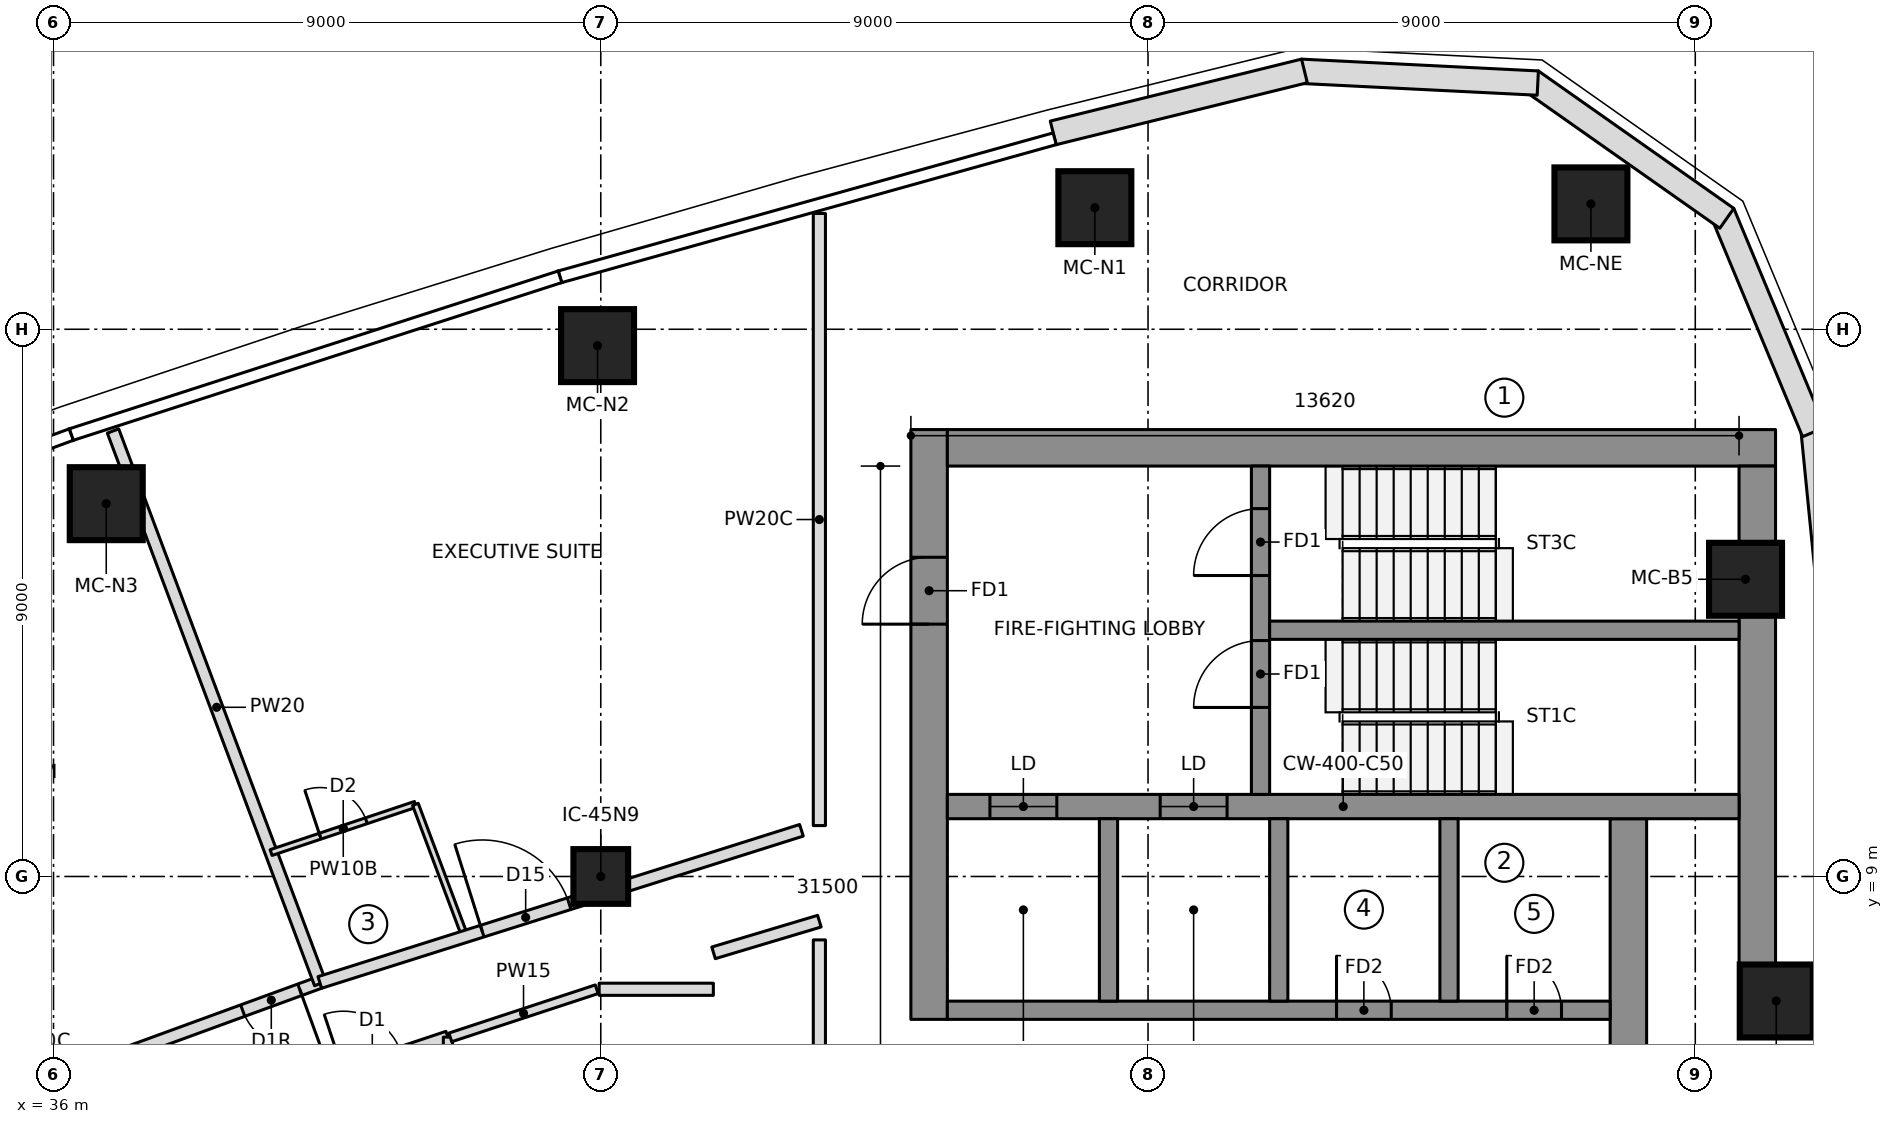
"""IFC4 building model, lengths in metres.
Left out: names, types, materials, properties, quantities, classifications, styles, units other than length and angle.
Written with IfcOpenShell. Run it as: python <this file> out.ifc"""

import sys

from ifc_helpers import new_model, si_unit, direction, frame, frame_2d, origin, origin_2d, place, context, subcontext, project, spatial, polyline, rectangle, outline, extrude, element, fill, save


model = new_model("IFC4")
c1 = context("Model", 3, precision=1e-05, world=origin(), true_north=direction((0.0, 1.0)))
c2 = subcontext(c1, "Body", "Model", "MODEL_VIEW")
j1 = project(units=[si_unit("LENGTHUNIT", "METRE"), si_unit("PLANEANGLEUNIT", "RADIAN")], contexts=[c1])
p1 = place(None, origin())
s1 = spatial("IfcSite", under=j1, at=p1, CompositionType="ELEMENT")
p2 = place(p1, origin())
s2 = spatial("IfcBuilding", under=s1, at=p2, CompositionType="ELEMENT")
p3 = place(p2, frame((0.0, 0.0, 238.55)))
s3 = spatial("IfcBuildingStorey", under=s2, at=p3, CompositionType="ELEMENT", Elevation=238.55)
p4 = place(p3, frame((50.4, 6.65, 0.0), z_axis=(0.0, 0.0, 1.0), x_axis=(0.0, 1.0, 0.0)))
e1 = element("IfcWall", 1, at=p4, inside=s3, PredefinedType="SHEAR", context=c2, shape_type="SweptSolid", body=[
    extrude(rectangle(XDim=9.7, YDim=0.6, at=frame_2d((4.85, 0.0))), origin(), (0.0, 0.0, 1.0), 3.55),
])
p5 = place(p4, frame((6.5, 0.0, 0.0)))
e2 = element("IfcOpeningElement", 2, at=p5, cuts=e1, PredefinedType="OPENING", context=c2, shape_type="SweptSolid", body=[
    extrude(rectangle(XDim=1.1, YDim=2.1, at=frame_2d((0.55, 1.05))), frame((0.0, 0.31, 0.0), z_axis=(0.0, -1.0, 0.0), x_axis=(1.0, 0.0, 0.0)), (0.0, 0.0, 1.0), 0.62),
])
p6 = place(p3, frame((50.7, 16.05, 0.0), z_axis=(0.0, 0.0, 1.0), x_axis=(1.0, 0.0, 0.0)))
e3 = element("IfcWall", 3, at=p6, inside=s3, PredefinedType="SHEAR", context=c2, shape_type="SweptSolid", body=[
    extrude(rectangle(XDim=13.62, YDim=0.6, at=frame_2d((6.81, 0.0))), origin(), (0.0, 0.0, 1.0), 3.55),
])
p7 = place(p3, frame((64.02, 7.502, 0.0), z_axis=(0.0, 0.0, 1.0), x_axis=(0.0, 1.0, 0.0)))
e4 = element("IfcWall", 4, at=p7, inside=s3, PredefinedType="SHEAR", context=c2, shape_type="SweptSolid", body=[
    extrude(rectangle(XDim=8.248, YDim=0.6, at=frame_2d((4.124, 0.0))), origin(), (0.0, 0.0, 1.0), 3.55),
])
p8 = place(p3, frame((61.9, -9.95, 0.0), z_axis=(0.0, 0.0, 1.0), x_axis=(0.0, 1.0, 0.0)))
e5 = element("IfcWall", 5, at=p8, inside=s3, PredefinedType="SHEAR", context=c2, shape_type="SweptSolid", body=[
    extrude(rectangle(XDim=19.9, YDim=0.6, at=frame_2d((9.95, 0.0))), origin(), (0.0, 0.0, 1.0), 3.55),
])
p9 = place(p3, frame((50.7, 10.15, 0.0), z_axis=(0.0, 0.0, 1.0), x_axis=(1.0, 0.0, 0.0)))
e6 = element("IfcWall", 6, at=p9, inside=s3, PredefinedType="SHEAR", context=c2, shape_type="SweptSolid", body=[
    extrude(rectangle(XDim=13.02, YDim=0.4, at=frame_2d((6.51, 0.0))), origin(), (0.0, 0.0, 1.0), 3.55),
])
p10 = place(p9, frame((0.7, 0.0, 0.0)))
e7 = element("IfcOpeningElement", 7, at=p10, cuts=e6, PredefinedType="OPENING", context=c2, shape_type="SweptSolid", body=[
    extrude(rectangle(XDim=1.1, YDim=2.1, at=frame_2d((0.55, 1.05))), frame((0.0, 0.21, 0.0), z_axis=(0.0, -1.0, 0.0), x_axis=(1.0, 0.0, 0.0)), (0.0, 0.0, 1.0), 0.42),
])
p11 = place(p9, frame((3.5, 0.0, 0.0)))
e8 = element("IfcOpeningElement", 8, at=p11, cuts=e6, PredefinedType="OPENING", context=c2, shape_type="SweptSolid", body=[
    extrude(rectangle(XDim=1.1, YDim=2.1, at=frame_2d((0.55, 1.05))), frame((0.0, 0.21, 0.0), z_axis=(0.0, -1.0, 0.0), x_axis=(1.0, 0.0, 0.0)), (0.0, 0.0, 1.0), 0.42),
])
p12 = place(p3, frame((50.7, 6.8, 0.0), z_axis=(0.0, 0.0, 1.0), x_axis=(1.0, 0.0, 0.0)))
e9 = element("IfcWall", 9, at=p12, inside=s3, PredefinedType="SHEAR", context=c2, shape_type="SweptSolid", body=[
    extrude(rectangle(XDim=10.9, YDim=0.3, at=frame_2d((5.45, 0.0))), origin(), (0.0, 0.0, 1.0), 3.55),
])
p13 = place(p12, frame((6.4, 0.0, 0.0)))
e10 = element("IfcOpeningElement", 10, at=p13, cuts=e9, PredefinedType="OPENING", context=c2, shape_type="SweptSolid", body=[
    extrude(rectangle(XDim=0.9, YDim=2.1, at=frame_2d((0.45, 1.05))), frame((0.0, 0.16, 0.0), z_axis=(0.0, -1.0, 0.0), x_axis=(1.0, 0.0, 0.0)), (0.0, 0.0, 1.0), 0.32),
])
p14 = place(p12, frame((9.2, 0.0, 0.0)))
e11 = element("IfcOpeningElement", 11, at=p14, cuts=e9, PredefinedType="OPENING", context=c2, shape_type="SweptSolid", body=[
    extrude(rectangle(XDim=0.9, YDim=2.1, at=frame_2d((0.45, 1.05))), frame((0.0, 0.16, 0.0), z_axis=(0.0, -1.0, 0.0), x_axis=(1.0, 0.0, 0.0)), (0.0, 0.0, 1.0), 0.32),
])
for number, where, z_axis, x_axis in (
    (12, (53.35, 6.95, 0.0), (0.0, 0.0, 1.0), (0.0, 1.0, 0.0)),
    (13, (56.15, 6.95, 0.0), (0.0, 0.0, 1.0), (0.0, 1.0, 0.0)),
    (14, (58.95, 6.95, 0.0), (0.0, 0.0, 1.0), (0.0, 1.0, 0.0)),
):
    element("IfcWall", number, at=place(p3, frame(where, z_axis=z_axis, x_axis=x_axis)), inside=s3, PredefinedType="SHEAR", context=c2, shape_type="SweptSolid", body=[
        extrude(rectangle(XDim=3.0, YDim=0.3, at=frame_2d((1.5, 0.0))), origin(), (0.0, 0.0, 1.0), 3.55),
    ])
p15 = place(p3, frame((55.85, 10.35, 0.0), z_axis=(0.0, 0.0, 1.0), x_axis=(0.0, 1.0, 0.0)))
e15 = element("IfcWall", 15, at=p15, inside=s3, PredefinedType="SHEAR", context=c2, shape_type="SweptSolid", body=[
    extrude(rectangle(XDim=5.4, YDim=0.3, at=frame_2d((2.7, 0.0))), origin(), (0.0, 0.0, 1.0), 3.55),
])
p16 = place(p15, frame((1.43, 0.0, 0.0)))
e16 = element("IfcOpeningElement", 16, at=p16, cuts=e15, PredefinedType="OPENING", context=c2, shape_type="SweptSolid", body=[
    extrude(rectangle(XDim=1.1, YDim=2.1, at=frame_2d((0.55, 1.05))), frame((0.0, 0.16, 0.0), z_axis=(0.0, -1.0, 0.0), x_axis=(1.0, 0.0, 0.0)), (0.0, 0.0, 1.0), 0.32),
])
p17 = place(p15, frame((3.6, 0.0, 0.0)))
e17 = element("IfcOpeningElement", 17, at=p17, cuts=e15, PredefinedType="OPENING", context=c2, shape_type="SweptSolid", body=[
    extrude(rectangle(XDim=1.1, YDim=2.1, at=frame_2d((0.55, 1.05))), frame((0.0, 0.16, 0.0), z_axis=(0.0, -1.0, 0.0), x_axis=(1.0, 0.0, 0.0)), (0.0, 0.0, 1.0), 0.32),
])
p18 = place(p3, frame((56.0, 13.05, 0.0), z_axis=(0.0, 0.0, 1.0), x_axis=(1.0, 0.0, 0.0)))
e18 = element("IfcWall", 18, at=p18, inside=s3, PredefinedType="SHEAR", context=c2, shape_type="SweptSolid", body=[
    extrude(rectangle(XDim=7.72, YDim=0.3, at=frame_2d((3.86, 0.0))), origin(), (0.0, 0.0, 1.0), 3.55),
])
for number, where, z_axis, x_axis in (
    (19, (64.332, 6.952, 0.0), (0.0, 0.0, 1.0), (1.0, 0.0, 0.0)),
    (20, (63.826, 13.888, 0.0), (0.0, 0.0, 1.0), (1.0, 0.0, 0.0)),
    (21, (61.284, 20.062, 0.0), (0.0, 0.0, 1.0), (1.0, 0.0, 0.0)),
    (22, (53.125, 20.0, 0.0), (0.0, 0.0, 1.0), (1.0, 0.0, 0.0)),
    (23, (44.947, 17.731, 0.0), (0.0, 0.0, 1.0), (1.0, 0.0, 0.0)),
    (24, (36.867, 15.132, 0.0), (0.0, 0.0, 1.0), (1.0, 0.0, 0.0)),
):
    element("IfcColumn", number, at=place(p3, frame(where, z_axis=z_axis, x_axis=x_axis)), inside=s3, PredefinedType="COLUMN", context=c2, shape_type="SweptSolid", body=[
        extrude(rectangle(XDim=1.2, YDim=1.2, at=origin_2d()), origin(), (0.0, 0.0, 1.0), 3.55),
    ])
p19 = place(p3, frame((45.0, 9.0, 0.0), z_axis=(0.0, 0.0, 1.0), x_axis=(1.0, 0.0, 0.0)))
e25 = element("IfcColumn", 25, at=p19, inside=s3, PredefinedType="COLUMN", context=c2, shape_type="SweptSolid", body=[
    extrude(rectangle(XDim=0.9, YDim=0.9, at=origin_2d()), origin(), (0.0, 0.0, 1.0), 3.55),
])
p20 = place(p3, frame((65.342, 12.264, 0.0), z_axis=(0.0, 0.0, 1.0), x_axis=(-0.098718218066, 0.995115427185, 0.0)))
e26 = element("IfcWall", 26, at=p20, inside=s3, PredefinedType="NOTDEFINED", context=c2, shape_type="SweptSolid", body=[
    extrude(outline(polyline([(-0.003, -0.2), (4.123, -0.2), (4.063, 0.2), (0.003, 0.2), (-0.003, -0.2)])), origin(), (0.0, 0.0, 1.0), 3.25),
])
p21 = place(p3, frame((64.938, 16.337, 0.0), z_axis=(0.0, 0.0, 1.0), x_axis=(-0.3844335483, 0.923152667191, 0.0)))
e27 = element("IfcWall", 27, at=p21, inside=s3, PredefinedType="NOTDEFINED", context=c2, shape_type="SweptSolid", body=[
    extrude(outline(polyline([(-0.03, -0.2), (3.871, -0.2), (3.756, 0.2), (0.03, 0.2), (-0.03, -0.2)])), origin(), (0.0, 0.0, 1.0), 3.25),
])
p22 = place(p3, frame((63.471, 19.858, 0.0), z_axis=(0.0, 0.0, 1.0), x_axis=(-0.817942545532, 0.575299915009, 0.0)))
e28 = element("IfcWall", 28, at=p22, inside=s3, PredefinedType="NOTDEFINED", context=c2, shape_type="SweptSolid", body=[
    extrude(outline(polyline([(-0.058, -0.2), (3.871, -0.2), (3.756, 0.2), (0.058, 0.2), (-0.058, -0.2)])), origin(), (0.0, 0.0, 1.0), 3.25),
])
p23 = place(p3, frame((60.352, 22.052, 0.0), z_axis=(0.0, 0.0, 1.0), x_axis=(-0.998758875872, 0.049806705046, 0.0)))
e29 = element("IfcWall", 29, at=p23, inside=s3, PredefinedType="NOTDEFINED", context=c2, shape_type="SweptSolid", body=[
    extrude(outline(polyline([(-0.058, -0.2), (3.843, -0.2), (3.784, 0.2), (0.058, 0.2), (-0.058, -0.2)])), origin(), (0.0, 0.0, 1.0), 3.25),
])
p24 = place(p3, frame((56.543, 22.242, 0.0), z_axis=(0.0, 0.0, 1.0), x_axis=(-0.970902342456, -0.23947576373, 0.0)))
e30 = element("IfcWall", 30, at=p24, inside=s3, PredefinedType="NOTDEFINED", context=c2, shape_type="SweptSolid", body=[
    extrude(outline(polyline([(-0.029, -0.2), (4.226, -0.2), (4.226, 0.2), (0.029, 0.2), (-0.029, -0.2)])), origin(), (0.0, 0.0, 1.0), 3.25),
])
p25 = place(p3, frame((40.38, 7.257, 0.0), z_axis=(0.0, 0.0, 1.0), x_axis=(-0.939266239759, -0.343189351305, 0.0)))
e31 = element("IfcWall", 31, at=p25, inside=s3, PredefinedType="PARTITIONING", context=c2, shape_type="SweptSolid", body=[
    extrude(rectangle(XDim=9.2, YDim=0.2, at=frame_2d((4.6, 0.0))), origin(), (0.0, 0.0, 1.0), 3.25),
])
p26 = place(p25, frame((0.35, 0.0, 0.0)))
e32 = element("IfcOpeningElement", 32, at=p26, cuts=e31, PredefinedType="OPENING", context=c2, shape_type="SweptSolid", body=[
    extrude(rectangle(XDim=1.0, YDim=2.1, at=frame_2d((0.5, 1.05))), frame((0.0, 0.11, 0.0), z_axis=(0.0, -1.0, 0.0), x_axis=(1.0, 0.0, 0.0)), (0.0, 0.0, 1.0), 0.22),
])
p27 = place(p3, frame((40.387, 7.238, 0.0), z_axis=(0.0, 0.0, 1.0), x_axis=(-0.351098633881, 0.936338480084, 0.0)))
e33 = element("IfcWall", 33, at=p27, inside=s3, PredefinedType="PARTITIONING", context=c2, shape_type="SweptSolid", body=[
    extrude(rectangle(XDim=9.707, YDim=0.2, at=frame_2d((4.853, 0.0))), origin(), (0.0, 0.0, 1.0), 3.25),
])
p28 = place(p3, frame((39.579, 9.393, 0.0), z_axis=(0.0, 0.0, 1.0), x_axis=(0.948468383404, 0.316871781141, 0.0)))
e34 = element("IfcWall", 34, at=p28, inside=s3, PredefinedType="PARTITIONING", context=c2, shape_type="SweptSolid", body=[
    extrude(rectangle(XDim=2.502, YDim=0.1, at=frame_2d((1.251, 0.0))), origin(), (0.0, 0.0, 1.0), 3.25),
])
p29 = place(p28, frame((0.85, 0.0, 0.0)))
e35 = element("IfcOpeningElement", 35, at=p29, cuts=e34, PredefinedType="OPENING", context=c2, shape_type="SweptSolid", body=[
    extrude(rectangle(XDim=0.8, YDim=2.1, at=frame_2d((0.4, 1.05))), frame((0.0, 0.06, 0.0), z_axis=(0.0, -1.0, 0.0), x_axis=(1.0, 0.0, 0.0)), (0.0, 0.0, 1.0), 0.12),
])
p30 = place(p3, frame((41.951, 10.186, 0.0), z_axis=(0.0, 0.0, 1.0), x_axis=(0.351146927505, -0.936320370014, 0.0)))
e36 = element("IfcWall", 36, at=p30, inside=s3, PredefinedType="PARTITIONING", context=c2, shape_type="SweptSolid", body=[
    extrude(rectangle(XDim=2.278, YDim=0.1, at=frame_2d((1.139, 0.0))), origin(), (0.0, 0.0, 1.0), 3.25),
])
p31 = place(p3, frame((39.999, 5.527, 0.0), z_axis=(0.0, 0.0, 1.0), x_axis=(0.948459565489, 0.316898173918, 0.0)))
e37 = element("IfcWall", 37, at=p31, inside=s3, PredefinedType="PARTITIONING", context=c2, shape_type="SweptSolid", body=[
    extrude(rectangle(XDim=2.622, YDim=0.2, at=frame_2d((1.311, 0.0))), origin(), (0.0, 0.0, 1.0), 3.25),
])
p32 = place(p31, frame((0.811, 0.0, 0.0)))
e38 = element("IfcOpeningElement", 38, at=p32, cuts=e37, PredefinedType="OPENING", context=c2, shape_type="SweptSolid", body=[
    extrude(rectangle(XDim=1.0, YDim=2.1, at=frame_2d((0.5, 1.05))), frame((0.0, 0.11, 0.0), z_axis=(0.0, -1.0, 0.0), x_axis=(1.0, 0.0, 0.0)), (0.0, 0.0, 1.0), 0.22),
])
p33 = place(p3, frame((42.486, -6.358, 0.0), z_axis=(0.0, 0.0, 1.0), x_axis=(0.0, 1.0, 0.0)))
e39 = element("IfcWall", 39, at=p33, inside=s3, PredefinedType="PARTITIONING", context=c2, shape_type="SweptSolid", body=[
    extrude(rectangle(XDim=12.716, YDim=0.15, at=frame_2d((6.358, 0.0))), origin(), (0.0, 0.0, 1.0), 3.25),
])
p34 = place(p3, frame((40.38, 7.257, 0.0), z_axis=(0.0, 0.0, 1.0), x_axis=(0.953536454425, 0.301277662768, 0.0)))
e40 = element("IfcWall", 40, at=p34, inside=s3, PredefinedType="PARTITIONING", context=c2, shape_type="SweptSolid", body=[
    extrude(rectangle(XDim=8.306, YDim=0.2, at=frame_2d((4.153, 0.0))), origin(), (0.0, 0.0, 1.0), 3.25),
])
p35 = place(p34, frame((2.8, 0.0, 0.0)))
e41 = element("IfcOpeningElement", 41, at=p35, cuts=e40, PredefinedType="OPENING", context=c2, shape_type="SweptSolid", body=[
    extrude(rectangle(XDim=1.5, YDim=2.1, at=frame_2d((0.75, 1.05))), frame((0.0, 0.11, 0.0), z_axis=(0.0, -1.0, 0.0), x_axis=(1.0, 0.0, 0.0)), (0.0, 0.0, 1.0), 0.22),
])
p36 = place(p3, frame((48.595, 7.957, 0.0), z_axis=(0.0, 0.0, 1.0), x_axis=(0.0, -1.0, 0.0)))
e42 = element("IfcWall", 42, at=p36, inside=s3, PredefinedType="PARTITIONING", context=c2, shape_type="SweptSolid", body=[
    extrude(rectangle(XDim=15.914, YDim=0.2, at=frame_2d((7.957, 0.0))), origin(), (0.0, 0.0, 1.0), 3.25),
])
p37 = place(p36, frame((7.457, 0.0, 0.0)))
e43 = element("IfcOpeningElement", 43, at=p37, cuts=e42, PredefinedType="OPENING", context=c2, shape_type="SweptSolid", body=[
    extrude(rectangle(XDim=1.0, YDim=2.1, at=frame_2d((0.5, 1.05))), frame((0.0, 0.11, 0.0), z_axis=(0.0, -1.0, 0.0), x_axis=(1.0, 0.0, 0.0)), (0.0, 0.0, 1.0), 0.22),
])
p38 = place(p3, frame((42.526, 6.353, 0.0), z_axis=(0.0, 0.0, 1.0), x_axis=(0.949956634582, 0.312381805511, 0.0)))
e44 = element("IfcWall", 44, at=p38, inside=s3, PredefinedType="PARTITIONING", context=c2, shape_type="SweptSolid", body=[
    extrude(rectangle(XDim=2.535, YDim=0.15, at=frame_2d((1.267, 0.0))), origin(), (0.0, 0.0, 1.0), 3.25),
])
p39 = place(p3, frame((44.973, 7.145, 0.0), z_axis=(0.0, 0.0, 1.0), x_axis=(0.999999991552, 0.0001299883, 0.0)))
e45 = element("IfcWall", 45, at=p39, inside=s3, PredefinedType="PARTITIONING", context=c2, shape_type="SweptSolid", body=[
    extrude(rectangle(XDim=1.878, YDim=0.2, at=frame_2d((0.939, 0.0))), origin(), (0.0, 0.0, 1.0), 3.25),
])
p40 = place(p3, frame((46.855, 7.744, 0.0), z_axis=(0.0, 0.0, 1.0), x_axis=(0.958014760688, 0.286718883759, 0.0)))
e46 = element("IfcWall", 46, at=p40, inside=s3, PredefinedType="PARTITIONING", context=c2, shape_type="SweptSolid", body=[
    extrude(rectangle(XDim=1.816, YDim=0.2, at=frame_2d((0.908, 0.0))), origin(), (0.0, 0.0, 1.0), 3.25),
])
p41 = place(p3, frame((48.595, 19.904, 0.0), z_axis=(0.0, 0.0, 1.0), x_axis=(0.0, -1.0, 0.0)))
e47 = element("IfcWall", 47, at=p41, inside=s3, PredefinedType="PARTITIONING", context=c2, shape_type="SweptSolid", body=[
    extrude(rectangle(XDim=10.067, YDim=0.2, at=frame_2d((5.034, 0.0))), origin(), (0.0, 0.0, 1.0), 3.25),
])
p42 = place(p26, origin())
e48 = element("IfcDoor", 48, at=p42, inside=s3, OperationType="SINGLE_SWING_RIGHT", PredefinedType="DOOR", context=c2, shape_type="SweptSolid", body=[
    extrude(rectangle(XDim=1.0, YDim=2.1, at=frame_2d((0.5, 1.05))), frame((0.0, 0.025, 0.0), z_axis=(0.0, -1.0, 0.0), x_axis=(1.0, 0.0, 0.0)), (0.0, 0.0, 1.0), 0.05),
])
fill(e32, e48)
p43 = place(p29, origin())
e49 = element("IfcDoor", 49, at=p43, inside=s3, OperationType="SINGLE_SWING_LEFT", PredefinedType="DOOR", context=c2, shape_type="SweptSolid", body=[
    extrude(rectangle(XDim=0.8, YDim=2.1, at=frame_2d((0.4, 1.05))), frame((0.0, 0.025, 0.0), z_axis=(0.0, -1.0, 0.0), x_axis=(1.0, 0.0, 0.0)), (0.0, 0.0, 1.0), 0.05),
])
fill(e35, e49)
p44 = place(p35, origin())
e50 = element("IfcDoor", 50, at=p44, inside=s3, OperationType="DOUBLE_DOOR_SINGLE_SWING", PredefinedType="DOOR", context=c2, shape_type="SweptSolid", body=[
    extrude(rectangle(XDim=1.5, YDim=2.1, at=frame_2d((0.75, 1.05))), frame((0.0, 0.025, 0.0), z_axis=(0.0, -1.0, 0.0), x_axis=(1.0, 0.0, 0.0)), (0.0, 0.0, 1.0), 0.05),
])
fill(e41, e50)
p45 = place(p10, origin())
e51 = element("IfcDoor", 51, at=p45, inside=s3, OperationType="DOUBLE_DOOR_SLIDING", PredefinedType="DOOR", context=c2, shape_type="SweptSolid", body=[
    extrude(rectangle(XDim=1.1, YDim=2.1, at=frame_2d((0.55, 1.05))), frame((0.0, 0.025, 0.0), z_axis=(0.0, -1.0, 0.0), x_axis=(1.0, 0.0, 0.0)), (0.0, 0.0, 1.0), 0.05),
])
fill(e7, e51)
p46 = place(p11, origin())
e52 = element("IfcDoor", 52, at=p46, inside=s3, OperationType="DOUBLE_DOOR_SLIDING", PredefinedType="DOOR", context=c2, shape_type="SweptSolid", body=[
    extrude(rectangle(XDim=1.1, YDim=2.1, at=frame_2d((0.55, 1.05))), frame((0.0, 0.025, 0.0), z_axis=(0.0, -1.0, 0.0), x_axis=(1.0, 0.0, 0.0)), (0.0, 0.0, 1.0), 0.05),
])
fill(e8, e52)
p47 = place(p16, origin())
e53 = element("IfcDoor", 53, at=p47, inside=s3, OperationType="SINGLE_SWING_RIGHT", PredefinedType="DOOR", context=c2, shape_type="SweptSolid", body=[
    extrude(rectangle(XDim=1.1, YDim=2.1, at=frame_2d((0.55, 1.05))), frame((0.0, 0.025, 0.0), z_axis=(0.0, -1.0, 0.0), x_axis=(1.0, 0.0, 0.0)), (0.0, 0.0, 1.0), 0.05),
])
fill(e16, e53)
p48 = place(p17, origin())
e54 = element("IfcDoor", 54, at=p48, inside=s3, OperationType="SINGLE_SWING_RIGHT", PredefinedType="DOOR", context=c2, shape_type="SweptSolid", body=[
    extrude(rectangle(XDim=1.1, YDim=2.1, at=frame_2d((0.55, 1.05))), frame((0.0, 0.025, 0.0), z_axis=(0.0, -1.0, 0.0), x_axis=(1.0, 0.0, 0.0)), (0.0, 0.0, 1.0), 0.05),
])
fill(e17, e54)
p49 = place(p5, origin())
e55 = element("IfcDoor", 55, at=p49, inside=s3, OperationType="SINGLE_SWING_RIGHT", PredefinedType="DOOR", context=c2, shape_type="SweptSolid", body=[
    extrude(rectangle(XDim=1.1, YDim=2.1, at=frame_2d((0.55, 1.05))), frame((0.0, 0.025, 0.0), z_axis=(0.0, -1.0, 0.0), x_axis=(1.0, 0.0, 0.0)), (0.0, 0.0, 1.0), 0.05),
])
fill(e2, e55)
p50 = place(p13, origin())
e56 = element("IfcDoor", 56, at=p50, inside=s3, OperationType="SINGLE_SWING_LEFT", PredefinedType="DOOR", context=c2, shape_type="SweptSolid", body=[
    extrude(rectangle(XDim=0.9, YDim=2.1, at=frame_2d((0.45, 1.05))), frame((0.0, 0.025, 0.0), z_axis=(0.0, -1.0, 0.0), x_axis=(1.0, 0.0, 0.0)), (0.0, 0.0, 1.0), 0.05),
])
fill(e10, e56)
p51 = place(p14, origin())
e57 = element("IfcDoor", 57, at=p51, inside=s3, OperationType="SINGLE_SWING_LEFT", PredefinedType="DOOR", context=c2, shape_type="SweptSolid", body=[
    extrude(rectangle(XDim=0.9, YDim=2.1, at=frame_2d((0.45, 1.05))), frame((0.0, 0.025, 0.0), z_axis=(0.0, -1.0, 0.0), x_axis=(1.0, 0.0, 0.0)), (0.0, 0.0, 1.0), 0.05),
])
fill(e11, e57)
save(model, sys.argv[1])
